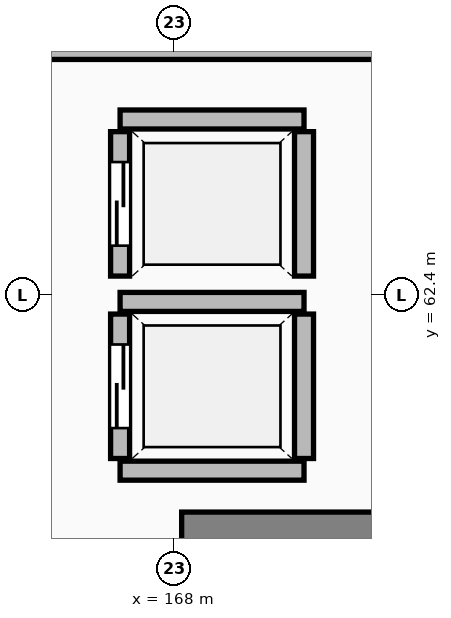
"""IFC4 building model, lengths in metres.
Left out: names, types, materials, properties, quantities, classifications, styles, units other than length and angle.
Written with IfcOpenShell. Run it as: python <this file> out.ifc"""

import sys

from ifc_helpers import new_model, si_unit, direction, frame, frame_2d, origin, place, context, subcontext, project, spatial, rectangle, extrude, element, fill, save


model = new_model("IFC4")
c1 = context("Model", 3, precision=1e-05, world=origin(), true_north=direction((0.0, 1.0)))
c2 = subcontext(c1, "Body", "Model", "MODEL_VIEW")
j1 = project(units=[si_unit("LENGTHUNIT", "METRE"), si_unit("PLANEANGLEUNIT", "RADIAN")], contexts=[c1])
p1 = place(None, origin())
s1 = spatial("IfcSite", under=j1, at=p1, CompositionType="ELEMENT")
p2 = place(p1, origin())
s2 = spatial("IfcBuilding", under=s1, at=p2, CompositionType="ELEMENT")
p3 = place(p2, frame((0.0, 0.0, -8.4)))
s3 = spatial("IfcBuildingStorey", under=s2, at=p3, CompositionType="ELEMENT", Elevation=-8.4)
p4 = place(p3, frame((168.1, 59.32, 0.0), z_axis=(0.0, 0.0, 1.0), x_axis=(1.0, 0.0, 0.0)))
e1 = element("IfcWall", 1, at=p4, inside=s3, PredefinedType="SHEAR", context=c2, shape_type="SweptSolid", body=[
    extrude(rectangle(XDim=3.67, YDim=0.45, at=frame_2d((1.835, 0.0))), origin(), (0.0, 0.0, 1.0), 3.86),
])
for number, where, z_axis, x_axis in (
    (2, (167.29, 60.09, 0.0), (0.0, 0.0, 1.0), (1.0, 0.0, 0.0)),
    (3, (167.29, 62.31, 0.0), (0.0, 0.0, 1.0), (1.0, 0.0, 0.0)),
):
    element("IfcWall", number, at=place(p3, frame(where, z_axis=z_axis, x_axis=x_axis)), inside=s3, PredefinedType="SOLIDWALL", context=c2, shape_type="SweptSolid", body=[
        extrude(rectangle(XDim=2.42, YDim=0.25, at=frame_2d((1.21, 0.0))), origin(), (0.0, 0.0, 1.0), 3.86),
    ])
p5 = place(p3, frame((167.29, 60.25, 0.0), z_axis=(0.0, 0.0, 1.0), x_axis=(0.0, 1.0, 0.0)))
e4 = element("IfcWall", 4, at=p5, inside=s3, PredefinedType="SOLIDWALL", context=c2, shape_type="SweptSolid", body=[
    extrude(rectangle(XDim=1.9, YDim=0.25, at=frame_2d((0.95, 0.0))), origin(), (0.0, 0.0, 1.0), 3.86),
])
p6 = place(p5, frame((0.4, 0.0, 0.0)))
e5 = element("IfcOpeningElement", 5, at=p6, cuts=e4, PredefinedType="OPENING", context=c2, shape_type="SweptSolid", body=[
    extrude(rectangle(XDim=1.1, YDim=2.2, at=frame_2d((0.55, 1.1))), frame((0.0, 0.137, 0.0), z_axis=(0.0, -1.0, 0.0), x_axis=(1.0, 0.0, 0.0)), (0.0, 0.0, 1.0), 0.274),
])
p7 = place(p3, frame((169.71, 60.25, 0.0), z_axis=(0.0, 0.0, 1.0), x_axis=(0.0, 1.0, 0.0)))
e6 = element("IfcWall", 6, at=p7, inside=s3, PredefinedType="SOLIDWALL", context=c2, shape_type="SweptSolid", body=[
    extrude(rectangle(XDim=1.9, YDim=0.25, at=frame_2d((0.95, 0.0))), origin(), (0.0, 0.0, 1.0), 3.86),
])
p8 = place(p3, frame((167.29, 64.71, 0.0), z_axis=(0.0, 0.0, 1.0), x_axis=(1.0, 0.0, 0.0)))
e7 = element("IfcWall", 7, at=p8, inside=s3, PredefinedType="SOLIDWALL", context=c2, shape_type="SweptSolid", body=[
    extrude(rectangle(XDim=2.42, YDim=0.25, at=frame_2d((1.21, 0.0))), origin(), (0.0, 0.0, 1.0), 3.86),
])
p9 = place(p3, frame((167.29, 62.65, 0.0), z_axis=(0.0, 0.0, 1.0), x_axis=(0.0, 1.0, 0.0)))
e8 = element("IfcWall", 8, at=p9, inside=s3, PredefinedType="SOLIDWALL", context=c2, shape_type="SweptSolid", body=[
    extrude(rectangle(XDim=1.9, YDim=0.25, at=frame_2d((0.95, 0.0))), origin(), (0.0, 0.0, 1.0), 3.86),
])
p10 = place(p9, frame((0.4, 0.0, 0.0)))
e9 = element("IfcOpeningElement", 9, at=p10, cuts=e8, PredefinedType="OPENING", context=c2, shape_type="SweptSolid", body=[
    extrude(rectangle(XDim=1.1, YDim=2.2, at=frame_2d((0.55, 1.1))), frame((0.0, 0.137, 0.0), z_axis=(0.0, -1.0, 0.0), x_axis=(1.0, 0.0, 0.0)), (0.0, 0.0, 1.0), 0.274),
])
p11 = place(p3, frame((169.71, 62.65, 0.0), z_axis=(0.0, 0.0, 1.0), x_axis=(0.0, 1.0, 0.0)))
e10 = element("IfcWall", 10, at=p11, inside=s3, PredefinedType="SOLIDWALL", context=c2, shape_type="SweptSolid", body=[
    extrude(rectangle(XDim=1.9, YDim=0.25, at=frame_2d((0.95, 0.0))), origin(), (0.0, 0.0, 1.0), 3.86),
])
p12 = place(p3, frame((166.1, 65.6, 0.0), z_axis=(0.0, 0.0, 1.0), x_axis=(1.0, 0.0, 0.0)))
e11 = element("IfcWall", 11, at=p12, inside=s3, PredefinedType="PARTITIONING", context=c2, shape_type="SweptSolid", body=[
    extrude(rectangle(XDim=13.0, YDim=0.2, at=frame_2d((6.5, 0.0))), origin(), (0.0, 0.0, 1.0), 2.972),
])
p13 = place(p6, origin())
e12 = element("IfcDoor", 12, at=p13, inside=s3, OperationType="SLIDING_TO_LEFT", PredefinedType="DOOR", context=c2, shape_type="SweptSolid", body=[
    extrude(rectangle(XDim=1.1, YDim=2.2, at=frame_2d((0.55, 1.1))), frame((0.0, 0.025, 0.0), z_axis=(0.0, -1.0, 0.0), x_axis=(1.0, 0.0, 0.0)), (0.0, 0.0, 1.0), 0.05),
])
fill(e5, e12)
p14 = place(p10, origin())
e13 = element("IfcDoor", 13, at=p14, inside=s3, OperationType="SLIDING_TO_LEFT", PredefinedType="DOOR", context=c2, shape_type="SweptSolid", body=[
    extrude(rectangle(XDim=1.1, YDim=2.2, at=frame_2d((0.55, 1.1))), frame((0.0, 0.025, 0.0), z_axis=(0.0, -1.0, 0.0), x_axis=(1.0, 0.0, 0.0)), (0.0, 0.0, 1.0), 0.05),
])
fill(e9, e13)
save(model, sys.argv[1])
